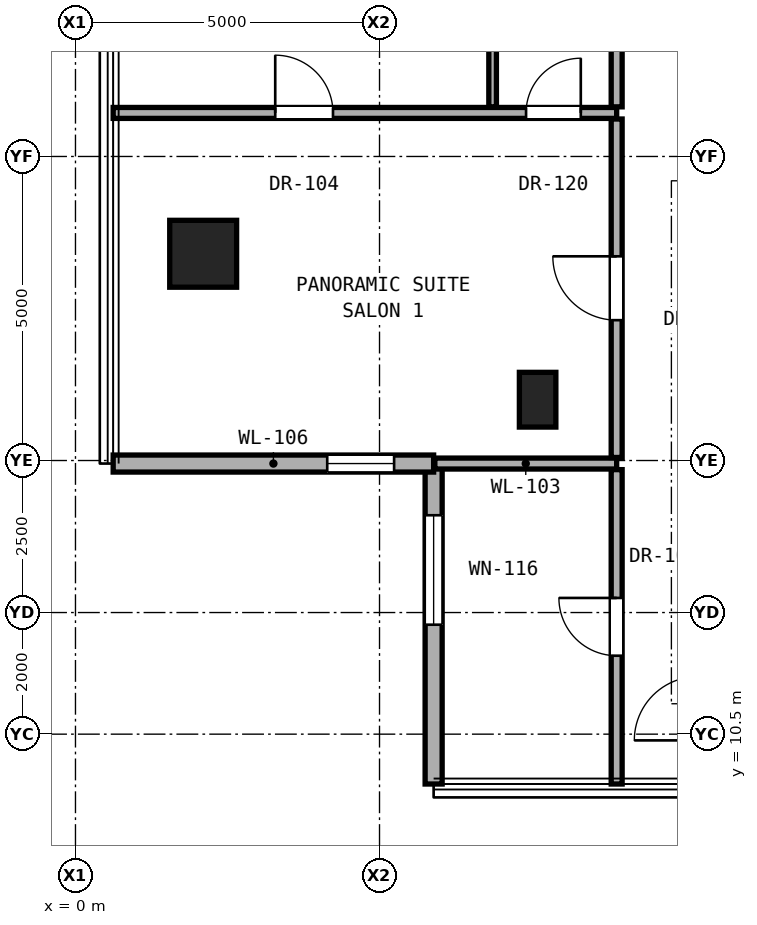
"""IFC4 building model, lengths in metres.
Left out: names, types, materials, properties, quantities, classifications, styles, units other than length and angle.
Written with IfcOpenShell. Run it as: python <this file> out.ifc"""

import sys

from ifc_helpers import new_model, si_unit, direction, frame, frame_2d, origin, origin_2d, place, context, subcontext, project, spatial, rectangle, hollow_rectangle, extrude, element, fill, save


model = new_model("IFC4")
c1 = context("Model", 3, precision=1e-05, world=origin(), true_north=direction((0.0, 1.0)))
c2 = subcontext(c1, "Body", "Model", "MODEL_VIEW")
j1 = project(units=[si_unit("LENGTHUNIT", "METRE"), si_unit("PLANEANGLEUNIT", "RADIAN")], contexts=[c1])
p1 = place(None, origin())
s1 = spatial("IfcSite", under=j1, at=p1, CompositionType="ELEMENT")
p2 = place(p1, origin())
s2 = spatial("IfcBuilding", under=s1, at=p2, CompositionType="ELEMENT")
p3 = place(p2, frame((0.0, 0.0, 118.1)))
s3 = spatial("IfcBuildingStorey", under=s2, at=p3, CompositionType="ELEMENT", Elevation=118.1)
p4 = place(p3, frame((2.1, 18.4, 0.0), z_axis=(0.0, 0.0, 1.0), x_axis=(1.0, 0.0, 0.0)))
e1 = element("IfcColumn", 1, at=p4, inside=s3, PredefinedType="COLUMN", context=c2, shape_type="SweptSolid", body=[
    extrude(hollow_rectangle(XDim=1.1, YDim=1.1, WallThickness=0.06, at=origin_2d()), origin(), (0.0, 0.0, 1.0), 3.3),
])
p5 = place(p3, frame((7.6, 16.0, 0.0), z_axis=(0.0, 0.0, 1.0), x_axis=(1.0, 0.0, 0.0)))
e2 = element("IfcColumn", 2, at=p5, inside=s3, PredefinedType="PILASTER", context=c2, shape_type="SweptSolid", body=[
    extrude(rectangle(XDim=0.6, YDim=0.9, at=origin_2d()), origin(), (0.0, 0.0, 1.0), 3.3),
])
p6 = place(p3, frame((5.89, 14.95, 0.0), z_axis=(0.0, 0.0, 1.0), x_axis=(0.0, -1.0, 0.0)))
e3 = element("IfcWall", 3, at=p6, inside=s3, PredefinedType="SOLIDWALL", context=c2, shape_type="SweptSolid", body=[
    extrude(rectangle(XDim=5.27, YDim=0.28, at=frame_2d((2.635, 0.0))), origin(), (0.0, 0.0, 1.0), 3.06),
])
p7 = place(p6, frame((0.85, 0.0, 0.81)))
e4 = element("IfcOpeningElement", 4, at=p7, cuts=e3, PredefinedType="OPENING", context=c2, shape_type="SweptSolid", body=[
    extrude(rectangle(XDim=1.8, YDim=2.1, at=frame_2d((0.9, 1.05))), frame((0.0, 0.15, 0.0), z_axis=(0.0, -1.0, 0.0), x_axis=(1.0, 0.0, 0.0)), (0.0, 0.0, 1.0), 0.3),
])
p8 = place(p3, frame((0.62, 14.95, 0.0), z_axis=(0.0, 0.0, 1.0), x_axis=(1.0, 0.0, 0.0)))
e5 = element("IfcWall", 5, at=p8, inside=s3, PredefinedType="SOLIDWALL", context=c2, shape_type="SweptSolid", body=[
    extrude(rectangle(XDim=5.27, YDim=0.28, at=frame_2d((2.635, 0.0))), origin(), (0.0, 0.0, 1.0), 3.06),
])
p9 = place(p8, frame((3.52, 0.0, 0.85)))
e6 = element("IfcOpeningElement", 6, at=p9, cuts=e5, PredefinedType="OPENING", context=c2, shape_type="SweptSolid", body=[
    extrude(rectangle(XDim=1.1, YDim=2.0, at=frame_2d((0.55, 1.0))), frame((0.0, 0.15, 0.0), z_axis=(0.0, -1.0, 0.0), x_axis=(1.0, 0.0, 0.0)), (0.0, 0.0, 1.0), 0.3),
])
p10 = place(p3, frame((5.91, 14.95, 0.0), z_axis=(0.0, 0.0, 1.0), x_axis=(1.0, 0.0, 0.0)))
e7 = element("IfcWall", 7, at=p10, inside=s3, PredefinedType="PARTITIONING", context=c2, shape_type="SweptSolid", body=[
    extrude(rectangle(XDim=2.99, YDim=0.18, at=frame_2d((1.495, 0.0))), origin(), (0.0, 0.0, 1.0), 3.08),
])
p11 = place(p3, frame((0.62, 20.716, 0.0), z_axis=(0.0, 0.0, 1.0), x_axis=(1.0, 0.0, 0.0)))
e8 = element("IfcWall", 8, at=p11, inside=s3, PredefinedType="PARTITIONING", context=c2, shape_type="SweptSolid", body=[
    extrude(rectangle(XDim=8.28, YDim=0.18, at=frame_2d((4.14, 0.0))), origin(), (0.0, 0.0, 1.0), 2.299),
])
p12 = place(p11, frame((2.665, 0.0, 0.0)))
e9 = element("IfcOpeningElement", 9, at=p12, cuts=e8, PredefinedType="OPENING", context=c2, shape_type="SweptSolid", body=[
    extrude(rectangle(XDim=0.95, YDim=2.15, at=frame_2d((0.475, 1.075))), frame((0.0, 0.1, 0.0), z_axis=(0.0, -1.0, 0.0), x_axis=(1.0, 0.0, 0.0)), (0.0, 0.0, 1.0), 0.2),
])
p13 = place(p11, frame((6.79, 0.0, 0.0)))
e10 = element("IfcOpeningElement", 10, at=p13, cuts=e8, PredefinedType="OPENING", context=c2, shape_type="SweptSolid", body=[
    extrude(rectangle(XDim=0.9, YDim=2.1, at=frame_2d((0.45, 1.05))), frame((0.0, 0.1, 0.0), z_axis=(0.0, -1.0, 0.0), x_axis=(1.0, 0.0, 0.0)), (0.0, 0.0, 1.0), 0.2),
])
p14 = place(p3, frame((6.86, 20.816, 0.0), z_axis=(0.0, 0.0, 1.0), x_axis=(0.0, 1.0, 0.0)))
e11 = element("IfcWall", 11, at=p14, inside=s3, PredefinedType="PARTITIONING", context=c2, shape_type="SweptSolid", body=[
    extrude(rectangle(XDim=2.1, YDim=0.125, at=frame_2d((1.05, 0.0))), origin(), (0.0, 0.0, 1.0), 3.08),
])
p15 = place(p3, frame((8.9, 9.68, 0.0), z_axis=(0.0, 0.0, 1.0), x_axis=(0.0, 1.0, 0.0)))
e12 = element("IfcWall", 12, at=p15, inside=s3, PredefinedType="PARTITIONING", context=c2, shape_type="SweptSolid", body=[
    extrude(rectangle(XDim=5.17, YDim=0.18, at=frame_2d((2.585, 0.0))), origin(), (0.0, 0.0, 1.0), 3.08),
])
p16 = place(p15, frame((2.11, 0.0, 0.0)))
e13 = element("IfcOpeningElement", 13, at=p16, cuts=e12, PredefinedType="OPENING", context=c2, shape_type="SweptSolid", body=[
    extrude(rectangle(XDim=0.95, YDim=2.15, at=frame_2d((0.475, 1.075))), frame((0.0, 0.1, 0.0), z_axis=(0.0, -1.0, 0.0), x_axis=(1.0, 0.0, 0.0)), (0.0, 0.0, 1.0), 0.2),
])
p17 = place(p3, frame((8.9, 15.05, 0.0), z_axis=(0.0, 0.0, 1.0), x_axis=(0.0, 1.0, 0.0)))
e14 = element("IfcWall", 14, at=p17, inside=s3, PredefinedType="PARTITIONING", context=c2, shape_type="SweptSolid", body=[
    extrude(rectangle(XDim=5.566, YDim=0.18, at=frame_2d((2.783, 0.0))), origin(), (0.0, 0.0, 1.0), 2.456),
])
p18 = place(p17, frame((2.258, 0.0, 0.0)))
e15 = element("IfcOpeningElement", 15, at=p18, cuts=e14, PredefinedType="OPENING", context=c2, shape_type="SweptSolid", body=[
    extrude(rectangle(XDim=1.05, YDim=2.2, at=frame_2d((0.525, 1.1))), frame((0.0, 0.1, 0.0), z_axis=(0.0, -1.0, 0.0), x_axis=(1.0, 0.0, 0.0)), (0.0, 0.0, 1.0), 0.2),
])
p19 = place(p3, frame((8.9, 20.816, 0.0), z_axis=(0.0, 0.0, 1.0), x_axis=(0.0, 1.0, 0.0)))
e16 = element("IfcWall", 16, at=p19, inside=s3, PredefinedType="PARTITIONING", context=c2, shape_type="SweptSolid", body=[
    extrude(rectangle(XDim=2.1, YDim=0.18, at=frame_2d((1.05, 0.0))), origin(), (0.0, 0.0, 1.0), 3.08),
])
p20 = place(p7, origin())
e17 = element("IfcWindow", 17, at=p20, inside=s3, PartitioningType="SINGLE_PANEL", PredefinedType="WINDOW", context=c2, shape_type="SweptSolid", body=[
    extrude(rectangle(XDim=1.8, YDim=2.1, at=frame_2d((0.9, 1.05))), frame((0.0, 0.03, 0.0), z_axis=(0.0, -1.0, 0.0), x_axis=(1.0, 0.0, 0.0)), (0.0, 0.0, 1.0), 0.06),
])
fill(e4, e17)
p21 = place(p9, origin())
e18 = element("IfcWindow", 18, at=p21, inside=s3, PartitioningType="SINGLE_PANEL", PredefinedType="WINDOW", context=c2, shape_type="SweptSolid", body=[
    extrude(rectangle(XDim=1.1, YDim=2.0, at=frame_2d((0.55, 1.0))), frame((0.0, 0.03, 0.0), z_axis=(0.0, -1.0, 0.0), x_axis=(1.0, 0.0, 0.0)), (0.0, 0.0, 1.0), 0.06),
])
fill(e6, e18)
p22 = place(p18, origin())
e19 = element("IfcDoor", 19, at=p22, inside=s3, OperationType="SINGLE_SWING_RIGHT", PredefinedType="DOOR", context=c2, shape_type="SweptSolid", body=[
    extrude(rectangle(XDim=1.05, YDim=2.2, at=frame_2d((0.525, 1.1))), frame((0.0, 0.025, 0.0), z_axis=(0.0, -1.0, 0.0), x_axis=(1.0, 0.0, 0.0)), (0.0, 0.0, 1.0), 0.05),
])
fill(e15, e19)
p23 = place(p12, origin())
e20 = element("IfcDoor", 20, at=p23, inside=s3, OperationType="SINGLE_SWING_LEFT", PredefinedType="DOOR", context=c2, shape_type="SweptSolid", body=[
    extrude(rectangle(XDim=0.95, YDim=2.15, at=frame_2d((0.475, 1.075))), frame((0.0, 0.025, 0.0), z_axis=(0.0, -1.0, 0.0), x_axis=(1.0, 0.0, 0.0)), (0.0, 0.0, 1.0), 0.05),
])
fill(e9, e20)
p24 = place(p13, origin())
e21 = element("IfcDoor", 21, at=p24, inside=s3, OperationType="SINGLE_SWING_RIGHT", PredefinedType="DOOR", context=c2, shape_type="SweptSolid", body=[
    extrude(rectangle(XDim=0.9, YDim=2.1, at=frame_2d((0.45, 1.05))), frame((0.0, 0.025, 0.0), z_axis=(0.0, -1.0, 0.0), x_axis=(1.0, 0.0, 0.0)), (0.0, 0.0, 1.0), 0.05),
])
fill(e10, e21)
p25 = place(p16, origin())
e22 = element("IfcDoor", 22, at=p25, inside=s3, OperationType="SINGLE_SWING_RIGHT", PredefinedType="DOOR", context=c2, shape_type="SweptSolid", body=[
    extrude(rectangle(XDim=0.95, YDim=2.15, at=frame_2d((0.475, 1.075))), frame((0.0, 0.025, 0.0), z_axis=(0.0, -1.0, 0.0), x_axis=(1.0, 0.0, 0.0)), (0.0, 0.0, 1.0), 0.05),
])
fill(e13, e22)
save(model, sys.argv[1])
